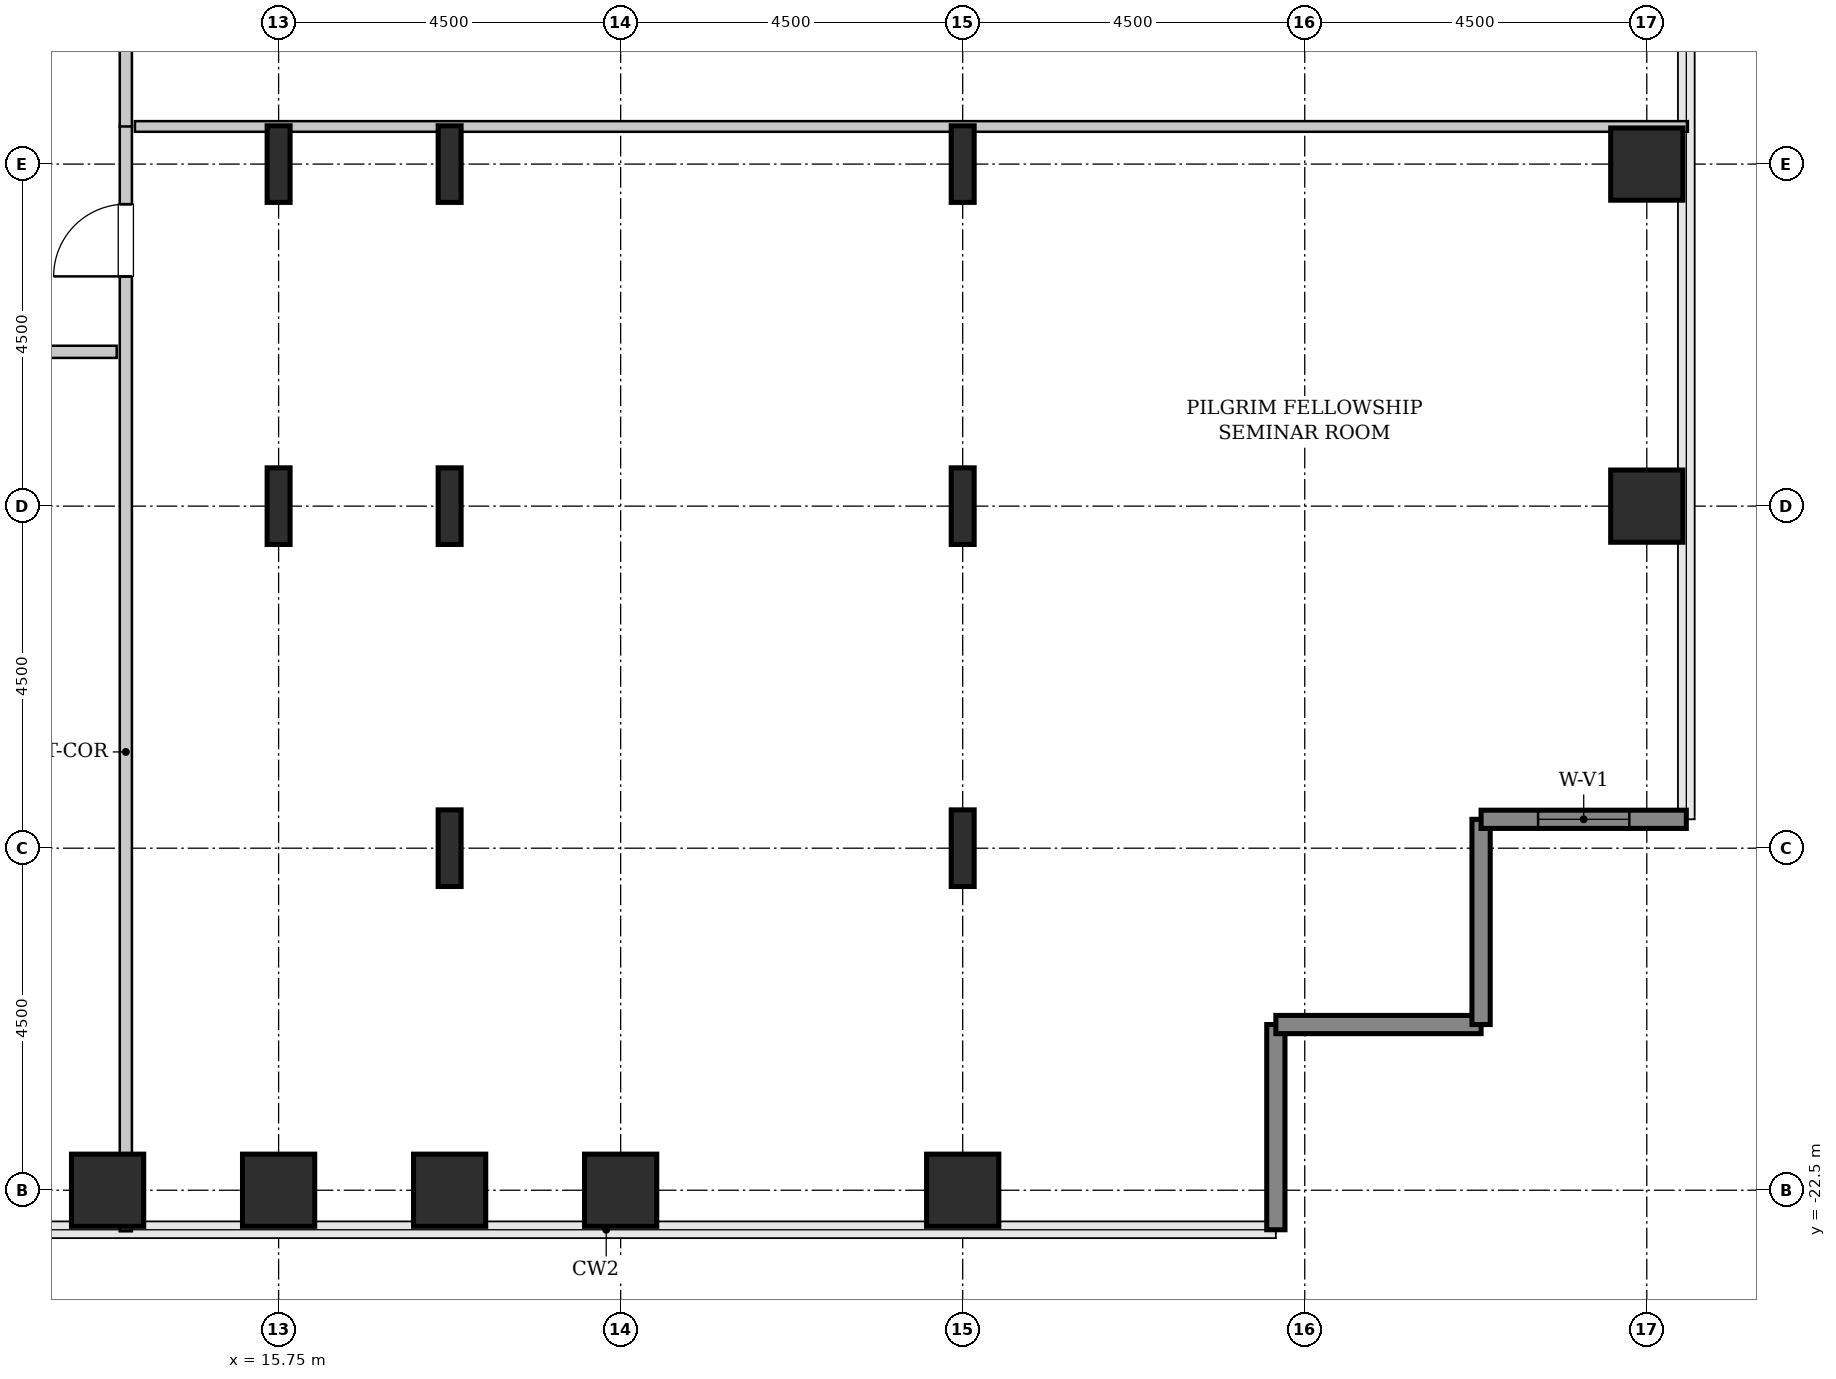
"""IFC4 building model, lengths in metres.
Left out: names, types, materials, properties, quantities, classifications, styles, units other than length and angle.
Written with IfcOpenShell. Run it as: python <this file> out.ifc"""

import sys

from ifc_helpers import new_model, si_unit, direction, frame, frame_2d, origin, origin_2d, place, context, subcontext, project, spatial, rectangle, hollow_rectangle, i_section, extrude, source, transform, mapped, element, fill, save


model = new_model("IFC4")
c1 = context("Model", 3, precision=1e-05, world=origin(), true_north=direction((0.0, 1.0)))
c2 = subcontext(c1, "Body", "Model", "MODEL_VIEW")
j1 = project(units=[si_unit("LENGTHUNIT", "METRE"), si_unit("PLANEANGLEUNIT", "RADIAN")], contexts=[c1])
p1 = place(None, origin())
s1 = spatial("IfcSite", under=j1, at=p1, CompositionType="ELEMENT")
p2 = place(p1, origin())
s2 = spatial("IfcBuilding", under=s1, at=p2, CompositionType="ELEMENT")
p3 = place(p2, frame((0.0, 0.0, 59.6)))
s3 = spatial("IfcBuildingStorey", under=s2, at=p3, CompositionType="ELEMENT", Elevation=59.6)
m1 = source(origin(), c2, "Body", "SweptSolid", [
    extrude(hollow_rectangle(XDim=0.95, YDim=0.95, WallThickness=0.045, InnerFilletRadius=0.045, OuterFilletRadius=0.09, at=origin_2d()), origin(), (0.0, 0.0, 1.0), 3.8),
])
for number, where, z_axis, x_axis in (
    (1, (13.5, -22.5, 0.0), (0.0, 0.0, 1.0), (1.0, 0.0, 0.0)),
    (2, (15.75, -22.5, 0.0), (0.0, 0.0, 1.0), (1.0, 0.0, 0.0)),
):
    element("IfcColumn", number, at=place(p3, frame(where, z_axis=z_axis, x_axis=x_axis)), inside=s3, PredefinedType="COLUMN", context=c2, shape_type="MappedRepresentation", body=[
        mapped(m1, transform((0.0, 0.0, 0.0), x_axis=(1.0, 0.0, 0.0), y_axis=(0.0, 1.0, 0.0), z_axis=(0.0, 0.0, 1.0), scale=1.0)),
    ])
m2 = source(origin(), c2, "Body", "SweptSolid", [
    extrude(i_section(OverallWidth=0.302, OverallDepth=1.008, WebThickness=0.021, FlangeThickness=0.04, FilletRadius=0.03, at=origin_2d()), origin(), (0.0, 0.0, 1.0), 3.8),
])
for number, where, z_axis, x_axis in (
    (3, (15.75, -13.5, 0.0), (0.0, 0.0, 1.0), (1.0, 0.0, 0.0)),
    (4, (15.75, -9.0, 0.0), (0.0, 0.0, 1.0), (1.0, 0.0, 0.0)),
):
    element("IfcColumn", number, at=place(p3, frame(where, z_axis=z_axis, x_axis=x_axis)), inside=s3, PredefinedType="COLUMN", context=c2, shape_type="MappedRepresentation", body=[
        mapped(m2, transform((0.0, 0.0, 0.0), x_axis=(1.0, 0.0, 0.0), y_axis=(0.0, 1.0, 0.0), z_axis=(0.0, 0.0, 1.0), scale=1.0)),
    ])
p4 = place(p3, frame((18.0, -22.5, 0.0), z_axis=(0.0, 0.0, 1.0), x_axis=(1.0, 0.0, 0.0)))
e5 = element("IfcColumn", 5, at=p4, inside=s3, PredefinedType="COLUMN", context=c2, shape_type="MappedRepresentation", body=[
    mapped(m1, transform((0.0, 0.0, 0.0), x_axis=(1.0, 0.0, 0.0), y_axis=(0.0, 1.0, 0.0), z_axis=(0.0, 0.0, 1.0), scale=1.0)),
])
for number, where, z_axis, x_axis in (
    (6, (18.0, -18.0, 0.0), (0.0, 0.0, 1.0), (1.0, 0.0, 0.0)),
    (7, (18.0, -13.5, 0.0), (0.0, 0.0, 1.0), (1.0, 0.0, 0.0)),
    (8, (18.0, -9.0, 0.0), (0.0, 0.0, 1.0), (1.0, 0.0, 0.0)),
):
    element("IfcColumn", number, at=place(p3, frame(where, z_axis=z_axis, x_axis=x_axis)), inside=s3, PredefinedType="COLUMN", context=c2, shape_type="MappedRepresentation", body=[
        mapped(m2, transform((0.0, 0.0, 0.0), x_axis=(1.0, 0.0, 0.0), y_axis=(0.0, 1.0, 0.0), z_axis=(0.0, 0.0, 1.0), scale=1.0)),
    ])
for number, where, z_axis, x_axis in (
    (9, (20.25, -22.5, 0.0), (0.0, 0.0, 1.0), (1.0, 0.0, 0.0)),
    (10, (24.75, -22.5, 0.0), (0.0, 0.0, 1.0), (1.0, 0.0, 0.0)),
):
    element("IfcColumn", number, at=place(p3, frame(where, z_axis=z_axis, x_axis=x_axis)), inside=s3, PredefinedType="COLUMN", context=c2, shape_type="MappedRepresentation", body=[
        mapped(m1, transform((0.0, 0.0, 0.0), x_axis=(1.0, 0.0, 0.0), y_axis=(0.0, 1.0, 0.0), z_axis=(0.0, 0.0, 1.0), scale=1.0)),
    ])
for number, where, z_axis, x_axis in (
    (11, (24.75, -18.0, 0.0), (0.0, 0.0, 1.0), (1.0, 0.0, 0.0)),
    (12, (24.75, -13.5, 0.0), (0.0, 0.0, 1.0), (1.0, 0.0, 0.0)),
    (13, (24.75, -9.0, 0.0), (0.0, 0.0, 1.0), (1.0, 0.0, 0.0)),
):
    element("IfcColumn", number, at=place(p3, frame(where, z_axis=z_axis, x_axis=x_axis)), inside=s3, PredefinedType="COLUMN", context=c2, shape_type="MappedRepresentation", body=[
        mapped(m2, transform((0.0, 0.0, 0.0), x_axis=(1.0, 0.0, 0.0), y_axis=(0.0, 1.0, 0.0), z_axis=(0.0, 0.0, 1.0), scale=1.0)),
    ])
for number, where, z_axis, x_axis in (
    (14, (33.75, -13.5, 0.0), (0.0, 0.0, 1.0), (1.0, 0.0, 0.0)),
    (15, (33.75, -9.0, 0.0), (0.0, 0.0, 1.0), (1.0, 0.0, 0.0)),
):
    element("IfcColumn", number, at=place(p3, frame(where, z_axis=z_axis, x_axis=x_axis)), inside=s3, PredefinedType="COLUMN", context=c2, shape_type="MappedRepresentation", body=[
        mapped(m1, transform((0.0, 0.0, 0.0), x_axis=(1.0, 0.0, 0.0), y_axis=(0.0, 1.0, 0.0), z_axis=(0.0, 0.0, 1.0), scale=1.0)),
    ])
m3 = source(origin(), c2, "Body", "SweptSolid", [
    extrude(rectangle(XDim=2.7, YDim=0.24, at=frame_2d((1.35, 0.0))), origin(), (0.0, 0.0, 1.0), 3.55),
])
for number, where, z_axis, x_axis in (
    (16, (28.87, -23.02, 0.0), (0.0, 0.0, 1.0), (0.0, 1.0, 0.0)),
    (17, (28.87, -20.32, 0.0), (0.0, 0.0, 1.0), (1.0, 0.0, 0.0)),
    (18, (31.57, -20.32, 0.0), (0.0, 0.0, 1.0), (0.0, 1.0, 0.0)),
):
    element("IfcWall", number, at=place(p3, frame(where, z_axis=z_axis, x_axis=x_axis)), inside=s3, PredefinedType="SHEAR", context=c2, shape_type="MappedRepresentation", body=[
        mapped(m3, transform((0.0, 0.0, 0.0), x_axis=(1.0, 0.0, 0.0), y_axis=(0.0, 1.0, 0.0), z_axis=(0.0, 0.0, 1.0), scale=1.0)),
    ])
p5 = place(p3, frame((31.57, -17.62, 0.0), z_axis=(0.0, 0.0, 1.0), x_axis=(1.0, 0.0, 0.0)))
e19 = element("IfcWall", 19, at=p5, inside=s3, PredefinedType="SHEAR", context=c2, shape_type="MappedRepresentation", body=[
    mapped(m3, transform((0.0, 0.0, 0.0), x_axis=(1.0, 0.0, 0.0), y_axis=(0.0, 1.0, 0.0), z_axis=(0.0, 0.0, 1.0), scale=1.0)),
])
p6 = place(p5, frame((0.75, 0.0, 0.85)))
e20 = element("IfcOpeningElement", 20, at=p6, cuts=e19, PredefinedType="OPENING", context=c2, shape_type="SweptSolid", body=[
    extrude(rectangle(XDim=1.2, YDim=1.8, at=frame_2d((0.6, 0.9))), frame((0.0, 0.13, 0.0), z_axis=(0.0, -1.0, 0.0), x_axis=(1.0, 0.0, 0.0)), (0.0, 0.0, 1.0), 0.26),
])
m4 = source(origin(), c2, "Body", "SweptSolid", [
    extrude(rectangle(XDim=14.545, YDim=0.16, at=frame_2d((7.272, 0.0))), origin(), (0.0, 0.0, 1.0), 3.535),
])
p7 = place(p3, frame((13.74, -23.04, 0.0), z_axis=(0.0, 0.0, 1.0), x_axis=(0.0, 1.0, 0.0)))
e21 = element("IfcWall", 21, at=p7, inside=s3, PredefinedType="PARTITIONING", context=c2, shape_type="MappedRepresentation", body=[
    mapped(m4, transform((0.0, 0.0, 0.0), x_axis=(1.0, 0.0, 0.0), y_axis=(0.0, 1.0, 0.0), z_axis=(0.0, 0.0, 1.0), scale=1.0)),
])
p8 = place(p7, frame((12.562, 0.0, 0.0)))
e22 = element("IfcOpeningElement", 22, at=p8, cuts=e21, PredefinedType="OPENING", context=c2, shape_type="SweptSolid", body=[
    extrude(rectangle(XDim=0.95, YDim=2.1, at=frame_2d((0.475, 1.05))), frame((0.0, 0.09, 0.0), z_axis=(0.0, -1.0, 0.0), x_axis=(1.0, 0.0, 0.0)), (0.0, 0.0, 1.0), 0.18),
])
m5 = source(origin(), c2, "Body", "SweptSolid", [
    extrude(rectangle(XDim=20.43, YDim=0.14, at=frame_2d((10.215, 0.0))), origin(), (0.0, 0.0, 1.0), 2.825),
])
p9 = place(p3, frame((13.86, -8.505, 0.0), z_axis=(0.0, 0.0, 1.0), x_axis=(1.0, 0.0, 0.0)))
e23 = element("IfcWall", 23, at=p9, inside=s3, PredefinedType="PARTITIONING", context=c2, shape_type="MappedRepresentation", body=[
    mapped(m5, transform((0.0, 0.0, 0.0), x_axis=(1.0, 0.0, 0.0), y_axis=(0.0, 1.0, 0.0), z_axis=(0.0, 0.0, 1.0), scale=1.0)),
])
m6 = source(origin(), c2, "Body", "SweptSolid", [
    extrude(rectangle(XDim=3.31, YDim=0.16, at=frame_2d((1.655, 0.0))), origin(), (0.0, 0.0, 1.0), 3.535),
])
p10 = place(p3, frame((13.74, -8.505, 0.0), z_axis=(0.0, 0.0, 1.0), x_axis=(0.0, 1.0, 0.0)))
e24 = element("IfcWall", 24, at=p10, inside=s3, PredefinedType="PARTITIONING", context=c2, shape_type="MappedRepresentation", body=[
    mapped(m6, transform((0.0, 0.0, 0.0), x_axis=(1.0, 0.0, 0.0), y_axis=(0.0, 1.0, 0.0), z_axis=(0.0, 0.0, 1.0), scale=1.0)),
])
p11 = place(p10, frame((1.18, 0.0, 0.0)))
e25 = element("IfcOpeningElement", 25, at=p11, cuts=e24, PredefinedType="OPENING", context=c2, shape_type="SweptSolid", body=[
    extrude(rectangle(XDim=0.95, YDim=2.1, at=frame_2d((0.475, 1.05))), frame((0.0, 0.09, 0.0), z_axis=(0.0, -1.0, 0.0), x_axis=(1.0, 0.0, 0.0)), (0.0, 0.0, 1.0), 0.18),
])
m7 = source(origin(), c2, "Body", "SweptSolid", [
    extrude(rectangle(XDim=5.825, YDim=0.16, at=frame_2d((2.913, 0.0))), origin(), (0.0, 0.0, 1.0), 3.535),
])
p12 = place(p3, frame((7.795, -11.47, 0.0), z_axis=(0.0, 0.0, 1.0), x_axis=(1.0, 0.0, 0.0)))
e26 = element("IfcWall", 26, at=p12, inside=s3, PredefinedType="PARTITIONING", context=c2, shape_type="MappedRepresentation", body=[
    mapped(m7, transform((0.0, 0.0, 0.0), x_axis=(1.0, 0.0, 0.0), y_axis=(0.0, 1.0, 0.0), z_axis=(0.0, 0.0, 1.0), scale=1.0)),
])
p13 = place(p12, frame((2.438, 0.0, 0.0)))
e27 = element("IfcOpeningElement", 27, at=p13, cuts=e26, PredefinedType="OPENING", context=c2, shape_type="SweptSolid", body=[
    extrude(rectangle(XDim=0.95, YDim=2.1, at=frame_2d((0.475, 1.05))), frame((0.0, 0.09, 0.0), z_axis=(0.0, -1.0, 0.0), x_axis=(1.0, 0.0, 0.0)), (0.0, 0.0, 1.0), 0.18),
])
m8 = source(origin(), c2, "Body", "SweptSolid", [
    extrude(rectangle(XDim=1.2, YDim=1.8, at=frame_2d((0.6, 0.9))), frame((0.0, 0.03, 0.0), z_axis=(0.0, -1.0, 0.0), x_axis=(1.0, 0.0, 0.0)), (0.0, 0.0, 1.0), 0.06),
])
p14 = place(p6, origin())
e28 = element("IfcWindow", 28, at=p14, inside=s3, PartitioningType="SINGLE_PANEL", PredefinedType="WINDOW", context=c2, shape_type="MappedRepresentation", body=[
    mapped(m8, transform((0.0, 0.0, 0.0), x_axis=(1.0, 0.0, 0.0), y_axis=(0.0, 1.0, 0.0), z_axis=(0.0, 0.0, 1.0), scale=1.0)),
])
fill(e20, e28)
m9 = source(origin(), c2, "Body", "SweptSolid", [
    extrude(rectangle(XDim=0.95, YDim=2.1, at=frame_2d((0.475, 1.05))), frame((0.0, 0.025, 0.0), z_axis=(0.0, -1.0, 0.0), x_axis=(1.0, 0.0, 0.0)), (0.0, 0.0, 1.0), 0.05),
])
p15 = place(p8, origin())
e29 = element("IfcDoor", 29, at=p15, inside=s3, OperationType="SINGLE_SWING_LEFT", PredefinedType="DOOR", context=c2, shape_type="MappedRepresentation", body=[
    mapped(m9, transform((0.0, 0.0, 0.0), x_axis=(1.0, 0.0, 0.0), y_axis=(0.0, 1.0, 0.0), z_axis=(0.0, 0.0, 1.0), scale=1.0)),
])
fill(e22, e29)
save(model, sys.argv[1])
